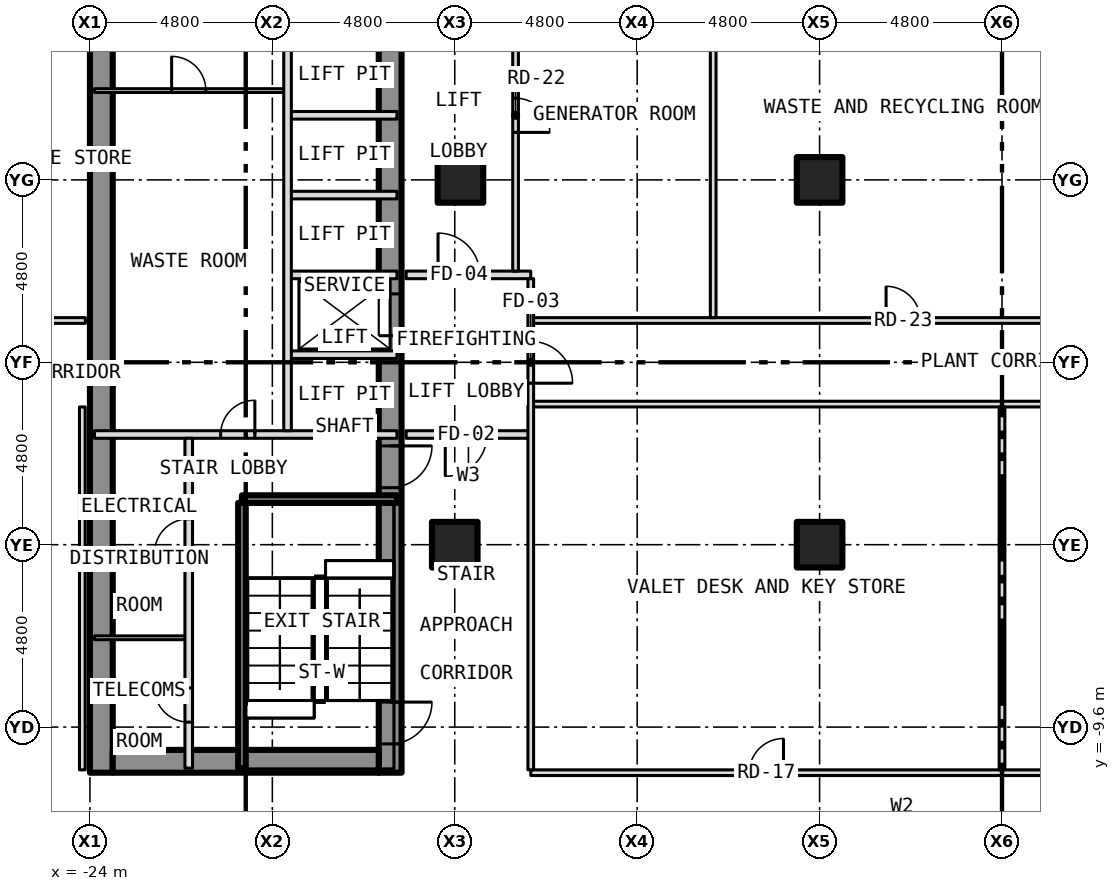
"""IFC4 building model, lengths in metres.
Left out: names, types, materials, properties, quantities, classifications, styles, units other than length and angle.
Written with IfcOpenShell. Run it as: python <this file> out.ifc"""

import sys

from ifc_helpers import new_model, si_unit, direction, frame, frame_2d, origin, origin_2d, place, context, subcontext, project, spatial, rectangle, hollow_rectangle, extrude, element, fill, save


model = new_model("IFC4")
c1 = context("Model", 3, precision=1e-05, world=origin(), true_north=direction((0.0, 1.0)))
c2 = subcontext(c1, "Body", "Model", "MODEL_VIEW")
j1 = project(units=[si_unit("LENGTHUNIT", "METRE"), si_unit("PLANEANGLEUNIT", "RADIAN")], contexts=[c1])
p1 = place(None, origin())
s1 = spatial("IfcSite", under=j1, at=p1, CompositionType="ELEMENT")
p2 = place(p1, origin())
s2 = spatial("IfcBuilding", under=s1, at=p2, CompositionType="ELEMENT")
p3 = place(p2, frame((0.0, 0.0, -5.0)))
s3 = spatial("IfcBuildingStorey", under=s2, at=p3, CompositionType="ELEMENT", Elevation=-5.0)
for number, where, z_axis, x_axis in (
    (1, (-14.4, -4.8, -0.3), (0.0, 0.0, 1.0), (1.0, 0.0, 0.0)),
    (2, (-14.25, 4.8, -0.3), (0.0, 0.0, 1.0), (1.0, 0.0, 0.0)),
    (3, (-4.8, -4.8, -0.3), (0.0, 0.0, 1.0), (1.0, 0.0, 0.0)),
    (4, (-4.8, 4.8, -0.3), (0.0, 0.0, 1.0), (1.0, 0.0, 0.0)),
):
    element("IfcColumn", number, at=place(p3, frame(where, z_axis=z_axis, x_axis=x_axis)), inside=s3, PredefinedType="COLUMN", context=c2, shape_type="SweptSolid", body=[
        extrude(hollow_rectangle(XDim=1.2, YDim=1.2, WallThickness=0.07, at=origin_2d()), origin(), (0.0, 0.0, 1.0), 5.0),
    ])
p4 = place(p3, frame((-16.1, -10.8, 0.0), z_axis=(0.0, 0.0, 1.0), x_axis=(0.0, 1.0, 0.0)))
e5 = element("IfcWall", 5, at=p4, inside=s3, PredefinedType="SHEAR", context=c2, shape_type="SweptSolid", body=[
    extrude(rectangle(XDim=21.6, YDim=0.6, at=frame_2d((10.8, 0.0))), origin(), (0.0, 0.0, 1.0), 4.7),
])
p5 = place(p4, frame((11.5, 0.0, 0.0)))
e6 = element("IfcOpeningElement", 6, at=p5, cuts=e5, PredefinedType="OPENING", context=c2, shape_type="SweptSolid", body=[
    extrude(rectangle(XDim=1.1, YDim=2.1, at=frame_2d((0.55, 1.05))), frame((0.0, 0.312, 0.0), z_axis=(0.0, -1.0, 0.0), x_axis=(1.0, 0.0, 0.0)), (0.0, 0.0, 1.0), 0.624),
])
p6 = place(p4, frame((0.758, 0.0, 0.0)))
e7 = element("IfcOpeningElement", 7, at=p6, cuts=e5, PredefinedType="OPENING", context=c2, shape_type="SweptSolid", body=[
    extrude(rectangle(XDim=1.1, YDim=2.1, at=frame_2d((0.55, 1.05))), frame((0.0, 0.312, 0.0), z_axis=(0.0, -1.0, 0.0), x_axis=(1.0, 0.0, 0.0)), (0.0, 0.0, 1.0), 0.624),
])
p7 = place(p4, frame((7.5, 0.0, 0.0)))
e8 = element("IfcOpeningElement", 8, at=p7, cuts=e5, PredefinedType="OPENING", context=c2, shape_type="SweptSolid", body=[
    extrude(rectangle(XDim=1.1, YDim=2.1, at=frame_2d((0.55, 1.05))), frame((0.0, 0.312, 0.0), z_axis=(0.0, -1.0, 0.0), x_axis=(1.0, 0.0, 0.0)), (0.0, 0.0, 1.0), 0.624),
])
p8 = place(p3, frame((-23.7, -10.8, 0.0), z_axis=(0.0, 0.0, 1.0), x_axis=(0.0, 1.0, 0.0)))
e9 = element("IfcWall", 9, at=p8, inside=s3, PredefinedType="SHEAR", context=c2, shape_type="SweptSolid", body=[
    extrude(rectangle(XDim=21.6, YDim=0.6, at=frame_2d((10.8, 0.0))), origin(), (0.0, 0.0, 1.0), 4.7),
])
p9 = place(p3, frame((-23.4, -10.5, 0.0), z_axis=(0.0, 0.0, 1.0), x_axis=(1.0, 0.0, 0.0)))
e10 = element("IfcWall", 10, at=p9, inside=s3, PredefinedType="SHEAR", context=c2, shape_type="SweptSolid", body=[
    extrude(rectangle(XDim=7.0, YDim=0.6, at=frame_2d((3.5, 0.0))), origin(), (0.0, 0.0, 1.0), 4.7),
])
p10 = place(p3, frame((-12.4, -10.8, 0.0), z_axis=(0.0, 0.0, 1.0), x_axis=(1.0, 0.0, 0.0)))
e11 = element("IfcWall", 11, at=p10, inside=s3, PredefinedType="PARTITIONING", context=c2, shape_type="SweptSolid", body=[
    extrude(rectangle(XDim=24.8, YDim=0.15, at=frame_2d((12.4, 0.0))), origin(), (0.0, 0.0, 1.0), 4.7),
])
p11 = place(p10, frame((5.75, 0.0, 0.0)))
e12 = element("IfcOpeningElement", 12, at=p11, cuts=e11, PredefinedType="OPENING", context=c2, shape_type="SweptSolid", body=[
    extrude(rectangle(XDim=0.9, YDim=2.1, at=frame_2d((0.45, 1.05))), frame((0.0, 0.087, 0.0), z_axis=(0.0, -1.0, 0.0), x_axis=(1.0, 0.0, 0.0)), (0.0, 0.0, 1.0), 0.174),
])
p12 = place(p10, frame((18.15, 0.0, 0.0)))
e13 = element("IfcOpeningElement", 13, at=p12, cuts=e11, PredefinedType="OPENING", context=c2, shape_type="SweptSolid", body=[
    extrude(rectangle(XDim=0.9, YDim=2.1, at=frame_2d((0.45, 1.05))), frame((0.0, 0.087, 0.0), z_axis=(0.0, -1.0, 0.0), x_axis=(1.0, 0.0, 0.0)), (0.0, 0.0, 1.0), 0.174),
])
p13 = place(p3, frame((-23.88, -7.25, 0.0), z_axis=(0.0, 0.0, 1.0), x_axis=(1.0, 0.0, 0.0)))
e14 = element("IfcWall", 14, at=p13, inside=s3, PredefinedType="PARTITIONING", context=c2, shape_type="SweptSolid", body=[
    extrude(rectangle(XDim=2.48, YDim=0.1, at=frame_2d((1.24, 0.0))), origin(), (0.0, 0.0, 1.0), 4.7),
])
p14 = place(p3, frame((-20.0, -3.6, 0.0), z_axis=(0.0, 0.0, 1.0), x_axis=(1.0, 0.0, 0.0)))
e15 = element("IfcWall", 15, at=p14, inside=s3, PredefinedType="SHEAR", context=c2, shape_type="SweptSolid", body=[
    extrude(rectangle(XDim=4.08, YDim=0.2, at=frame_2d((2.04, 0.0))), origin(), (0.0, 0.0, 1.0), 4.7),
])
p15 = place(p3, frame((-23.88, -1.9, 0.0), z_axis=(0.0, 0.0, 1.0), x_axis=(1.0, 0.0, 0.0)))
e16 = element("IfcWall", 16, at=p15, inside=s3, PredefinedType="PARTITIONING", context=c2, shape_type="SweptSolid", body=[
    extrude(rectangle(XDim=7.96, YDim=0.2, at=frame_2d((3.98, 0.0))), origin(), (0.0, 0.0, 1.0), 4.7),
])
p16 = place(p15, frame((3.32, 0.0, 0.0)))
e17 = element("IfcOpeningElement", 17, at=p16, cuts=e16, PredefinedType="OPENING", context=c2, shape_type="SweptSolid", body=[
    extrude(rectangle(XDim=0.9, YDim=2.1, at=frame_2d((0.45, 1.05))), frame((0.0, 0.112, 0.0), z_axis=(0.0, -1.0, 0.0), x_axis=(1.0, 0.0, 0.0)), (0.0, 0.0, 1.0), 0.224),
])
p17 = place(p3, frame((-15.68, -1.9, 0.0), z_axis=(0.0, 0.0, 1.0), x_axis=(1.0, 0.0, 0.0)))
e18 = element("IfcWall", 18, at=p17, inside=s3, PredefinedType="PARTITIONING", context=c2, shape_type="SweptSolid", body=[
    extrude(rectangle(XDim=3.28, YDim=0.2, at=frame_2d((1.64, 0.0))), origin(), (0.0, 0.0, 1.0), 4.7),
])
p18 = place(p17, frame((1.03, 0.0, 0.0)))
e19 = element("IfcOpeningElement", 19, at=p18, cuts=e18, PredefinedType="OPENING", context=c2, shape_type="SweptSolid", body=[
    extrude(rectangle(XDim=1.1, YDim=2.1, at=frame_2d((0.55, 1.05))), frame((0.0, 0.112, 0.0), z_axis=(0.0, -1.0, 0.0), x_axis=(1.0, 0.0, 0.0)), (0.0, 0.0, 1.0), 0.224),
])
p19 = place(p3, frame((-12.4, -1.1, 0.0), z_axis=(0.0, 0.0, 1.0), x_axis=(1.0, 0.0, 0.0)))
e20 = element("IfcWall", 20, at=p19, inside=s3, PredefinedType="PARTITIONING", context=c2, shape_type="SweptSolid", body=[
    extrude(rectangle(XDim=24.8, YDim=0.15, at=frame_2d((12.4, 0.0))), origin(), (0.0, 0.0, 1.0), 4.7),
])
p20 = place(p3, frame((-18.8, 0.2, 0.0), z_axis=(0.0, 0.0, 1.0), x_axis=(1.0, 0.0, 0.0)))
e21 = element("IfcWall", 21, at=p20, inside=s3, PredefinedType="PARTITIONING", context=c2, shape_type="SweptSolid", body=[
    extrude(rectangle(XDim=2.88, YDim=0.2, at=frame_2d((1.44, 0.0))), origin(), (0.0, 0.0, 1.0), 4.7),
])
p21 = place(p3, frame((-37.6, 1.1, 0.0), z_axis=(0.0, 0.0, 1.0), x_axis=(1.0, 0.0, 0.0)))
e22 = element("IfcWall", 22, at=p21, inside=s3, PredefinedType="PARTITIONING", context=c2, shape_type="SweptSolid", body=[
    extrude(rectangle(XDim=13.48, YDim=0.15, at=frame_2d((6.74, 0.0))), origin(), (0.0, 0.0, 1.0), 4.7),
])
p22 = place(p21, frame((4.55, 0.0, 0.0)))
e23 = element("IfcOpeningElement", 23, at=p22, cuts=e22, PredefinedType="OPENING", context=c2, shape_type="SweptSolid", body=[
    extrude(rectangle(XDim=0.9, YDim=2.1, at=frame_2d((0.45, 1.05))), frame((0.0, 0.087, 0.0), z_axis=(0.0, -1.0, 0.0), x_axis=(1.0, 0.0, 0.0)), (0.0, 0.0, 1.0), 0.174),
])
p23 = place(p21, frame((11.35, 0.0, 0.0)))
e24 = element("IfcOpeningElement", 24, at=p23, cuts=e22, PredefinedType="OPENING", context=c2, shape_type="SweptSolid", body=[
    extrude(rectangle(XDim=0.9, YDim=2.1, at=frame_2d((0.45, 1.05))), frame((0.0, 0.087, 0.0), z_axis=(0.0, -1.0, 0.0), x_axis=(1.0, 0.0, 0.0)), (0.0, 0.0, 1.0), 0.174),
])
p24 = place(p3, frame((-12.4, 1.1, 0.0), z_axis=(0.0, 0.0, 1.0), x_axis=(1.0, 0.0, 0.0)))
e25 = element("IfcWall", 25, at=p24, inside=s3, PredefinedType="PARTITIONING", context=c2, shape_type="SweptSolid", body=[
    extrude(rectangle(XDim=24.8, YDim=0.15, at=frame_2d((12.4, 0.0))), origin(), (0.0, 0.0, 1.0), 4.7),
])
p25 = place(p24, frame((9.35, 0.0, 0.0)))
e26 = element("IfcOpeningElement", 26, at=p25, cuts=e25, PredefinedType="OPENING", context=c2, shape_type="SweptSolid", body=[
    extrude(rectangle(XDim=0.9, YDim=2.1, at=frame_2d((0.45, 1.05))), frame((0.0, 0.087, 0.0), z_axis=(0.0, -1.0, 0.0), x_axis=(1.0, 0.0, 0.0)), (0.0, 0.0, 1.0), 0.174),
])
p26 = place(p24, frame((19.35, 0.0, 0.0)))
e27 = element("IfcOpeningElement", 27, at=p26, cuts=e25, PredefinedType="OPENING", context=c2, shape_type="SweptSolid", body=[
    extrude(rectangle(XDim=0.9, YDim=2.1, at=frame_2d((0.45, 1.05))), frame((0.0, 0.087, 0.0), z_axis=(0.0, -1.0, 0.0), x_axis=(1.0, 0.0, 0.0)), (0.0, 0.0, 1.0), 0.174),
])
p27 = place(p3, frame((-18.8, 2.3, 0.0), z_axis=(0.0, 0.0, 1.0), x_axis=(1.0, 0.0, 0.0)))
e28 = element("IfcWall", 28, at=p27, inside=s3, PredefinedType="PARTITIONING", context=c2, shape_type="SweptSolid", body=[
    extrude(rectangle(XDim=2.88, YDim=0.2, at=frame_2d((1.44, 0.0))), origin(), (0.0, 0.0, 1.0), 4.7),
])
p28 = place(p3, frame((-15.68, 2.3, 0.0), z_axis=(0.0, 0.0, 1.0), x_axis=(1.0, 0.0, 0.0)))
e29 = element("IfcWall", 29, at=p28, inside=s3, PredefinedType="PARTITIONING", context=c2, shape_type="SweptSolid", body=[
    extrude(rectangle(XDim=3.28, YDim=0.2, at=frame_2d((1.64, 0.0))), origin(), (0.0, 0.0, 1.0), 4.7),
])
p29 = place(p28, frame((0.84, 0.0, 0.0)))
e30 = element("IfcOpeningElement", 30, at=p29, cuts=e29, PredefinedType="OPENING", context=c2, shape_type="SweptSolid", body=[
    extrude(rectangle(XDim=1.1, YDim=2.1, at=frame_2d((0.55, 1.05))), frame((0.0, 0.112, 0.0), z_axis=(0.0, -1.0, 0.0), x_axis=(1.0, 0.0, 0.0)), (0.0, 0.0, 1.0), 0.224),
])
for number, where, z_axis, x_axis in (
    (31, (-18.8, 4.4, 0.0), (0.0, 0.0, 1.0), (1.0, 0.0, 0.0)),
    (32, (-18.8, 6.5, 0.0), (0.0, 0.0, 1.0), (1.0, 0.0, 0.0)),
):
    element("IfcWall", number, at=place(p3, frame(where, z_axis=z_axis, x_axis=x_axis)), inside=s3, PredefinedType="PARTITIONING", context=c2, shape_type="SweptSolid", body=[
        extrude(rectangle(XDim=2.88, YDim=0.2, at=frame_2d((1.44, 0.0))), origin(), (0.0, 0.0, 1.0), 4.7),
    ])
p30 = place(p3, frame((-23.88, 7.15, 0.0), z_axis=(0.0, 0.0, 1.0), x_axis=(1.0, 0.0, 0.0)))
e33 = element("IfcWall", 33, at=p30, inside=s3, PredefinedType="PARTITIONING", context=c2, shape_type="SweptSolid", body=[
    extrude(rectangle(XDim=5.08, YDim=0.1, at=frame_2d((2.54, 0.0))), origin(), (0.0, 0.0, 1.0), 4.7),
])
p31 = place(p30, frame((2.03, 0.0, 0.0)))
e34 = element("IfcOpeningElement", 34, at=p31, cuts=e33, PredefinedType="OPENING", context=c2, shape_type="SweptSolid", body=[
    extrude(rectangle(XDim=0.9, YDim=2.1, at=frame_2d((0.45, 1.05))), frame((0.0, 0.062, 0.0), z_axis=(0.0, -1.0, 0.0), x_axis=(1.0, 0.0, 0.0)), (0.0, 0.0, 1.0), 0.124),
])
p32 = place(p3, frame((-24.2, -10.725, 0.0), z_axis=(0.0, 0.0, 1.0), x_axis=(0.0, 1.0, 0.0)))
e35 = element("IfcWall", 35, at=p32, inside=s3, PredefinedType="PARTITIONING", context=c2, shape_type="SweptSolid", body=[
    extrude(rectangle(XDim=9.55, YDim=0.15, at=frame_2d((4.775, 0.0))), origin(), (0.0, 0.0, 1.0), 4.7),
])
p33 = place(p3, frame((-21.4, -10.68, 0.0), z_axis=(0.0, 0.0, 1.0), x_axis=(0.0, 1.0, 0.0)))
e36 = element("IfcWall", 36, at=p33, inside=s3, PredefinedType="PARTITIONING", context=c2, shape_type="SweptSolid", body=[
    extrude(rectangle(XDim=8.68, YDim=0.2, at=frame_2d((4.34, 0.0))), origin(), (0.0, 0.0, 1.0), 4.7),
])
p34 = place(p33, frame((1.21, 0.0, 0.0)))
e37 = element("IfcOpeningElement", 37, at=p34, cuts=e36, PredefinedType="OPENING", context=c2, shape_type="SweptSolid", body=[
    extrude(rectangle(XDim=0.9, YDim=2.1, at=frame_2d((0.45, 1.05))), frame((0.0, 0.112, 0.0), z_axis=(0.0, -1.0, 0.0), x_axis=(1.0, 0.0, 0.0)), (0.0, 0.0, 1.0), 0.224),
])
p35 = place(p33, frame((5.66, 0.0, 0.0)))
e38 = element("IfcOpeningElement", 38, at=p35, cuts=e36, PredefinedType="OPENING", context=c2, shape_type="SweptSolid", body=[
    extrude(rectangle(XDim=0.9, YDim=2.1, at=frame_2d((0.45, 1.05))), frame((0.0, 0.112, 0.0), z_axis=(0.0, -1.0, 0.0), x_axis=(1.0, 0.0, 0.0)), (0.0, 0.0, 1.0), 0.224),
])
p36 = place(p3, frame((-20.0, -10.68, 0.0), z_axis=(0.0, 0.0, 1.0), x_axis=(0.0, 1.0, 0.0)))
e39 = element("IfcWall", 39, at=p36, inside=s3, PredefinedType="SHEAR", context=c2, shape_type="SweptSolid", body=[
    extrude(rectangle(XDim=6.98, YDim=0.2, at=frame_2d((3.49, 0.0))), origin(), (0.0, 0.0, 1.0), 4.7),
])
p37 = place(p3, frame((-18.8, -1.8, 0.0), z_axis=(0.0, 0.0, 1.0), x_axis=(0.0, 1.0, 0.0)))
e40 = element("IfcWall", 40, at=p37, inside=s3, PredefinedType="PARTITIONING", context=c2, shape_type="SweptSolid", body=[
    extrude(rectangle(XDim=12.48, YDim=0.2, at=frame_2d((6.24, 0.0))), origin(), (0.0, 0.0, 1.0), 4.7),
])
p38 = place(p3, frame((-12.8, 2.4, 0.0), z_axis=(0.0, 0.0, 1.0), x_axis=(0.0, 1.0, 0.0)))
e41 = element("IfcWall", 41, at=p38, inside=s3, PredefinedType="PARTITIONING", context=c2, shape_type="SweptSolid", body=[
    extrude(rectangle(XDim=8.225, YDim=0.15, at=frame_2d((4.113, 0.0))), origin(), (0.0, 0.0, 1.0), 4.7),
])
p39 = place(p38, frame((3.65, 0.0, 0.0)))
e42 = element("IfcOpeningElement", 42, at=p39, cuts=e41, PredefinedType="OPENING", context=c2, shape_type="SweptSolid", body=[
    extrude(rectangle(XDim=0.9, YDim=2.1, at=frame_2d((0.45, 1.05))), frame((0.0, 0.087, 0.0), z_axis=(0.0, -1.0, 0.0), x_axis=(1.0, 0.0, 0.0)), (0.0, 0.0, 1.0), 0.174),
])
p40 = place(p3, frame((-12.4, -10.725, 0.0), z_axis=(0.0, 0.0, 1.0), x_axis=(0.0, 1.0, 0.0)))
e43 = element("IfcWall", 43, at=p40, inside=s3, PredefinedType="PARTITIONING", context=c2, shape_type="SweptSolid", body=[
    extrude(rectangle(XDim=12.925, YDim=0.15, at=frame_2d((6.462, 0.0))), origin(), (0.0, 0.0, 1.0), 4.7),
])
p41 = place(p40, frame((10.175, 0.0, 0.0)))
e44 = element("IfcOpeningElement", 44, at=p41, cuts=e43, PredefinedType="OPENING", context=c2, shape_type="SweptSolid", body=[
    extrude(rectangle(XDim=1.1, YDim=2.1, at=frame_2d((0.55, 1.05))), frame((0.0, 0.087, 0.0), z_axis=(0.0, -1.0, 0.0), x_axis=(1.0, 0.0, 0.0)), (0.0, 0.0, 1.0), 0.174),
])
p42 = place(p3, frame((-7.6, 1.175, 0.0), z_axis=(0.0, 0.0, 1.0), x_axis=(0.0, 1.0, 0.0)))
e45 = element("IfcWall", 45, at=p42, inside=s3, PredefinedType="PARTITIONING", context=c2, shape_type="SweptSolid", body=[
    extrude(rectangle(XDim=11.075, YDim=0.15, at=frame_2d((5.538, 0.0))), origin(), (0.0, 0.0, 1.0), 4.7),
])
p43 = place(p3, frame((0.0, -10.725, 0.0), z_axis=(0.0, 0.0, 1.0), x_axis=(0.0, 1.0, 0.0)))
e46 = element("IfcWall", 46, at=p43, inside=s3, PredefinedType="PARTITIONING", context=c2, shape_type="SweptSolid", body=[
    extrude(rectangle(XDim=5.771, YDim=0.15, at=frame_2d((2.885, 0.0))), origin(), (0.0, 0.0, 1.0), 4.083),
])
p44 = place(p3, frame((0.0, -4.954, 0.0), z_axis=(0.0, 0.0, 1.0), x_axis=(0.0, 1.0, 0.0)))
e47 = element("IfcWall", 47, at=p44, inside=s3, PredefinedType="PARTITIONING", context=c2, shape_type="SweptSolid", body=[
    extrude(rectangle(XDim=0.308, YDim=0.15, at=frame_2d((0.154, 0.0))), origin(), (0.0, 0.0, 1.0), 4.7),
])
p45 = place(p3, frame((0.0, -4.646, 0.0), z_axis=(0.0, 0.0, 1.0), x_axis=(0.0, 1.0, 0.0)))
e48 = element("IfcWall", 48, at=p45, inside=s3, PredefinedType="PARTITIONING", context=c2, shape_type="SweptSolid", body=[
    extrude(rectangle(XDim=3.471, YDim=0.15, at=frame_2d((1.735, 0.0))), origin(), (0.0, 0.0, 1.0), 4.083),
])
p46 = place(p5, origin())
e49 = element("IfcDoor", 49, at=p46, inside=s3, OperationType="SLIDING_TO_LEFT", PredefinedType="DOOR", context=c2, shape_type="SweptSolid", body=[
    extrude(rectangle(XDim=1.1, YDim=2.1, at=frame_2d((0.55, 1.05))), frame((0.0, 0.025, 0.0), z_axis=(0.0, -1.0, 0.0), x_axis=(1.0, 0.0, 0.0)), (0.0, 0.0, 1.0), 0.05),
])
fill(e6, e49)
p47 = place(p6, origin())
e50 = element("IfcDoor", 50, at=p47, inside=s3, OperationType="SINGLE_SWING_RIGHT", PredefinedType="DOOR", context=c2, shape_type="SweptSolid", body=[
    extrude(rectangle(XDim=1.1, YDim=2.1, at=frame_2d((0.55, 1.05))), frame((0.0, 0.025, 0.0), z_axis=(0.0, -1.0, 0.0), x_axis=(1.0, 0.0, 0.0)), (0.0, 0.0, 1.0), 0.05),
])
fill(e7, e50)
p48 = place(p7, origin())
e51 = element("IfcDoor", 51, at=p48, inside=s3, OperationType="SINGLE_SWING_RIGHT", PredefinedType="DOOR", context=c2, shape_type="SweptSolid", body=[
    extrude(rectangle(XDim=1.1, YDim=2.1, at=frame_2d((0.55, 1.05))), frame((0.0, 0.025, 0.0), z_axis=(0.0, -1.0, 0.0), x_axis=(1.0, 0.0, 0.0)), (0.0, 0.0, 1.0), 0.05),
])
fill(e8, e51)
p49 = place(p34, origin())
e52 = element("IfcDoor", 52, at=p49, inside=s3, OperationType="SINGLE_SWING_RIGHT", PredefinedType="DOOR", context=c2, shape_type="SweptSolid", body=[
    extrude(rectangle(XDim=0.9, YDim=2.1, at=frame_2d((0.45, 1.05))), frame((0.0, 0.025, 0.0), z_axis=(0.0, -1.0, 0.0), x_axis=(1.0, 0.0, 0.0)), (0.0, 0.0, 1.0), 0.05),
])
fill(e37, e52)
p50 = place(p35, origin())
e53 = element("IfcDoor", 53, at=p50, inside=s3, OperationType="SINGLE_SWING_LEFT", PredefinedType="DOOR", context=c2, shape_type="SweptSolid", body=[
    extrude(rectangle(XDim=0.9, YDim=2.1, at=frame_2d((0.45, 1.05))), frame((0.0, 0.025, 0.0), z_axis=(0.0, -1.0, 0.0), x_axis=(1.0, 0.0, 0.0)), (0.0, 0.0, 1.0), 0.05),
])
fill(e38, e53)
p51 = place(p16, origin())
e54 = element("IfcDoor", 54, at=p51, inside=s3, OperationType="SINGLE_SWING_RIGHT", PredefinedType="DOOR", context=c2, shape_type="SweptSolid", body=[
    extrude(rectangle(XDim=0.9, YDim=2.1, at=frame_2d((0.45, 1.05))), frame((0.0, 0.025, 0.0), z_axis=(0.0, -1.0, 0.0), x_axis=(1.0, 0.0, 0.0)), (0.0, 0.0, 1.0), 0.05),
])
fill(e17, e54)
p52 = place(p31, origin())
e55 = element("IfcDoor", 55, at=p52, inside=s3, OperationType="SINGLE_SWING_LEFT", PredefinedType="DOOR", context=c2, shape_type="SweptSolid", body=[
    extrude(rectangle(XDim=0.9, YDim=2.1, at=frame_2d((0.45, 1.05))), frame((0.0, 0.025, 0.0), z_axis=(0.0, -1.0, 0.0), x_axis=(1.0, 0.0, 0.0)), (0.0, 0.0, 1.0), 0.05),
])
fill(e34, e55)
p53 = place(p18, origin())
e56 = element("IfcDoor", 56, at=p53, inside=s3, OperationType="SINGLE_SWING_LEFT", PredefinedType="DOOR", context=c2, shape_type="SweptSolid", body=[
    extrude(rectangle(XDim=1.1, YDim=2.1, at=frame_2d((0.55, 1.05))), frame((0.0, 0.025, 0.0), z_axis=(0.0, -1.0, 0.0), x_axis=(1.0, 0.0, 0.0)), (0.0, 0.0, 1.0), 0.05),
])
fill(e19, e56)
p54 = place(p41, origin())
e57 = element("IfcDoor", 57, at=p54, inside=s3, OperationType="SINGLE_SWING_LEFT", PredefinedType="DOOR", context=c2, shape_type="SweptSolid", body=[
    extrude(rectangle(XDim=1.1, YDim=2.1, at=frame_2d((0.55, 1.05))), frame((0.0, 0.025, 0.0), z_axis=(0.0, -1.0, 0.0), x_axis=(1.0, 0.0, 0.0)), (0.0, 0.0, 1.0), 0.05),
])
fill(e44, e57)
p55 = place(p29, origin())
e58 = element("IfcDoor", 58, at=p55, inside=s3, OperationType="SINGLE_SWING_LEFT", PredefinedType="DOOR", context=c2, shape_type="SweptSolid", body=[
    extrude(rectangle(XDim=1.1, YDim=2.1, at=frame_2d((0.55, 1.05))), frame((0.0, 0.025, 0.0), z_axis=(0.0, -1.0, 0.0), x_axis=(1.0, 0.0, 0.0)), (0.0, 0.0, 1.0), 0.05),
])
fill(e30, e58)
p56 = place(p11, origin())
e59 = element("IfcDoor", 59, at=p56, inside=s3, OperationType="SINGLE_SWING_RIGHT", PredefinedType="DOOR", context=c2, shape_type="SweptSolid", body=[
    extrude(rectangle(XDim=0.9, YDim=2.1, at=frame_2d((0.45, 1.05))), frame((0.0, 0.025, 0.0), z_axis=(0.0, -1.0, 0.0), x_axis=(1.0, 0.0, 0.0)), (0.0, 0.0, 1.0), 0.05),
])
fill(e12, e59)
p57 = place(p39, origin())
e60 = element("IfcDoor", 60, at=p57, inside=s3, OperationType="SINGLE_SWING_LEFT", PredefinedType="DOOR", context=c2, shape_type="SweptSolid", body=[
    extrude(rectangle(XDim=0.9, YDim=2.1, at=frame_2d((0.45, 1.05))), frame((0.0, 0.025, 0.0), z_axis=(0.0, -1.0, 0.0), x_axis=(1.0, 0.0, 0.0)), (0.0, 0.0, 1.0), 0.05),
])
fill(e42, e60)
p58 = place(p25, origin())
e61 = element("IfcDoor", 61, at=p58, inside=s3, OperationType="SINGLE_SWING_LEFT", PredefinedType="DOOR", context=c2, shape_type="SweptSolid", body=[
    extrude(rectangle(XDim=0.9, YDim=2.1, at=frame_2d((0.45, 1.05))), frame((0.0, 0.025, 0.0), z_axis=(0.0, -1.0, 0.0), x_axis=(1.0, 0.0, 0.0)), (0.0, 0.0, 1.0), 0.05),
])
fill(e26, e61)
save(model, sys.argv[1])
